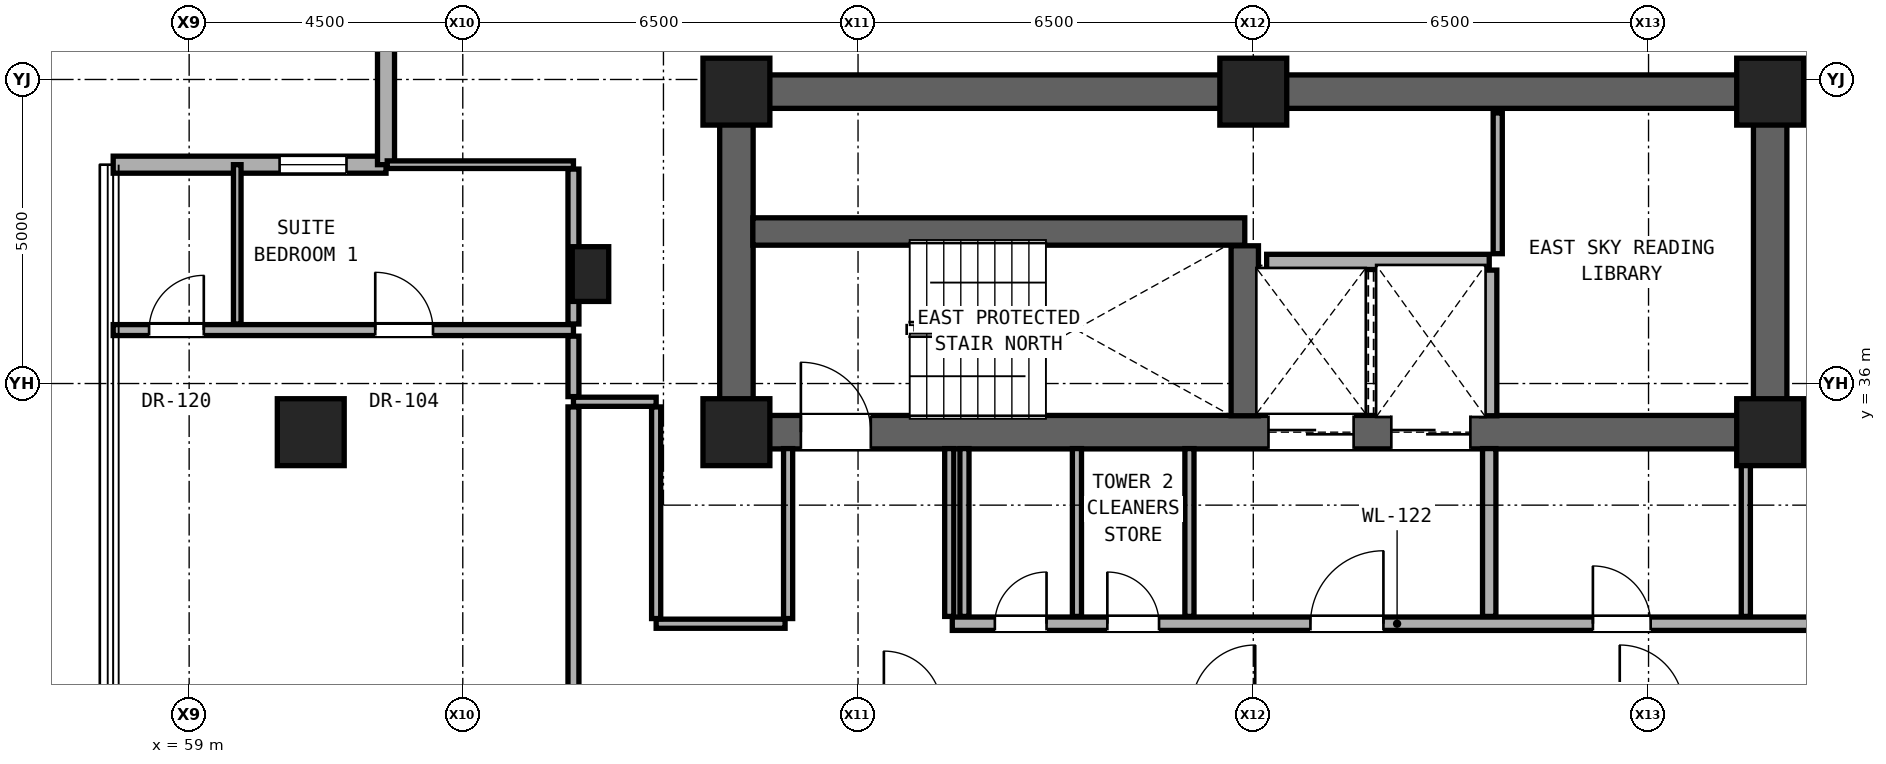
"""IFC4 building model, lengths in metres.
Left out: names, types, materials, properties, quantities, classifications, styles, units other than length and angle.
Written with IfcOpenShell. Run it as: python <this file> out.ifc"""

import sys

from ifc_helpers import new_model, si_unit, direction, frame, frame_2d, origin, origin_2d, place, context, subcontext, project, spatial, rectangle, hollow_rectangle, extrude, element, fill, save


model = new_model("IFC4")
c1 = context("Model", 3, precision=1e-05, world=origin(), true_north=direction((0.0, 1.0)))
c2 = subcontext(c1, "Body", "Model", "MODEL_VIEW")
j1 = project(units=[si_unit("LENGTHUNIT", "METRE"), si_unit("PLANEANGLEUNIT", "RADIAN")], contexts=[c1])
p1 = place(None, origin())
s1 = spatial("IfcSite", under=j1, at=p1, CompositionType="ELEMENT")
p2 = place(p1, origin())
s2 = spatial("IfcBuilding", under=s1, at=p2, CompositionType="ELEMENT")
p3 = place(p2, frame((0.0, 0.0, 144.5)))
s3 = spatial("IfcBuildingStorey", under=s2, at=p3, CompositionType="ELEMENT", Elevation=144.5)
for number, where, z_axis, x_axis in (
    (1, (68.0, 35.2, 0.0), (0.0, 0.0, 1.0), (1.0, 0.0, 0.0)),
    (2, (85.0, 35.2, 0.0), (0.0, 0.0, 1.0), (1.0, 0.0, 0.0)),
    (3, (68.0, 40.8, 0.0), (0.0, 0.0, 1.0), (1.0, 0.0, 0.0)),
    (4, (76.5, 40.8, 0.0), (0.0, 0.0, 1.0), (1.0, 0.0, 0.0)),
    (5, (85.0, 40.8, 0.0), (0.0, 0.0, 1.0), (1.0, 0.0, 0.0)),
):
    element("IfcColumn", number, at=place(p3, frame(where, z_axis=z_axis, x_axis=x_axis)), inside=s3, PredefinedType="COLUMN", context=c2, shape_type="SweptSolid", body=[
        extrude(rectangle(XDim=1.1, YDim=1.1, at=origin_2d()), origin(), (0.0, 0.0, 1.0), 3.3),
    ])
p4 = place(p3, frame((61.0, 35.2, 0.0), z_axis=(0.0, 0.0, 1.0), x_axis=(1.0, 0.0, 0.0)))
e6 = element("IfcColumn", 6, at=p4, inside=s3, PredefinedType="COLUMN", context=c2, shape_type="SweptSolid", body=[
    extrude(hollow_rectangle(XDim=1.1, YDim=1.1, WallThickness=0.06, at=origin_2d()), origin(), (0.0, 0.0, 1.0), 3.3),
])
p5 = place(p3, frame((65.6, 37.8, 0.0), z_axis=(0.0, 0.0, 1.0), x_axis=(1.0, 0.0, 0.0)))
e7 = element("IfcColumn", 7, at=p5, inside=s3, PredefinedType="PILASTER", context=c2, shape_type="SweptSolid", body=[
    extrude(rectangle(XDim=0.6, YDim=0.9, at=origin_2d()), origin(), (0.0, 0.0, 1.0), 3.3),
])
p6 = place(p3, frame((68.0, 40.8, 0.0), z_axis=(0.0, 0.0, 1.0), x_axis=(1.0, 0.0, 0.0)))
e8 = element("IfcWall", 8, at=p6, inside=s3, PredefinedType="SHEAR", context=c2, shape_type="SweptSolid", body=[
    extrude(rectangle(XDim=17.0, YDim=0.55, at=frame_2d((8.5, 0.0))), origin(), (0.0, 0.0, 1.0), 2.94),
])
for number, where, z_axis, x_axis in (
    (9, (68.0, 35.2, 0.0), (0.0, 0.0, 1.0), (0.0, 1.0, 0.0)),
    (10, (85.0, 35.2, 0.0), (0.0, 0.0, 1.0), (0.0, 1.0, 0.0)),
):
    element("IfcWall", number, at=place(p3, frame(where, z_axis=z_axis, x_axis=x_axis)), inside=s3, PredefinedType="SHEAR", context=c2, shape_type="SweptSolid", body=[
        extrude(rectangle(XDim=5.6, YDim=0.55, at=frame_2d((2.8, 0.0))), origin(), (0.0, 0.0, 1.0), 2.94),
    ])
p7 = place(p3, frame((68.0, 35.2, 0.0), z_axis=(0.0, 0.0, 1.0), x_axis=(1.0, 0.0, 0.0)))
e11 = element("IfcWall", 11, at=p7, inside=s3, PredefinedType="SHEAR", context=c2, shape_type="SweptSolid", body=[
    extrude(rectangle(XDim=17.0, YDim=0.55, at=frame_2d((8.5, 0.0))), origin(), (0.0, 0.0, 1.0), 2.94),
])
p8 = place(p7, frame((1.06, 0.0, 0.0)))
e12 = element("IfcOpeningElement", 12, at=p8, cuts=e11, PredefinedType="OPENING", context=c2, shape_type="SweptSolid", body=[
    extrude(rectangle(XDim=1.15, YDim=2.2, at=frame_2d((0.575, 1.1))), frame((0.0, 0.285, 0.0), z_axis=(0.0, -1.0, 0.0), x_axis=(1.0, 0.0, 0.0)), (0.0, 0.0, 1.0), 0.57),
])
p9 = place(p7, frame((8.75, 0.0, 0.0)))
e13 = element("IfcOpeningElement", 13, at=p9, cuts=e11, PredefinedType="OPENING", context=c2, shape_type="SweptSolid", body=[
    extrude(rectangle(XDim=1.4, YDim=2.35, at=frame_2d((0.7, 1.175))), frame((0.0, 0.285, 0.0), z_axis=(0.0, -1.0, 0.0), x_axis=(1.0, 0.0, 0.0)), (0.0, 0.0, 1.0), 0.57),
])
p10 = place(p7, frame((10.77, 0.0, 0.0)))
e14 = element("IfcOpeningElement", 14, at=p10, cuts=e11, PredefinedType="OPENING", context=c2, shape_type="SweptSolid", body=[
    extrude(rectangle(XDim=1.3, YDim=2.3, at=frame_2d((0.65, 1.15))), frame((0.0, 0.285, 0.0), z_axis=(0.0, -1.0, 0.0), x_axis=(1.0, 0.0, 0.0)), (0.0, 0.0, 1.0), 0.57),
])
p11 = place(p3, frame((62.238, 39.599, 0.0), z_axis=(0.0, 0.0, 1.0), x_axis=(-1.0, 0.0, 0.0)))
e15 = element("IfcWall", 15, at=p11, inside=s3, PredefinedType="SOLIDWALL", context=c2, shape_type="SweptSolid", body=[
    extrude(rectangle(XDim=4.487, YDim=0.28, at=frame_2d((2.243, 0.0))), origin(), (0.0, 0.0, 1.0), 2.56),
])
p12 = place(p11, frame((0.65, 0.0, 0.41)))
e16 = element("IfcOpeningElement", 16, at=p12, cuts=e15, PredefinedType="OPENING", context=c2, shape_type="SweptSolid", body=[
    extrude(rectangle(XDim=1.1, YDim=2.0, at=frame_2d((0.55, 1.0))), frame((0.0, 0.15, 0.0), z_axis=(0.0, -1.0, 0.0), x_axis=(1.0, 0.0, 0.0)), (0.0, 0.0, 1.0), 0.3),
])
p13 = place(p3, frame((62.238, 44.085, 0.0), z_axis=(0.0, 0.0, 1.0), x_axis=(0.0, -1.0, 0.0)))
e17 = element("IfcWall", 17, at=p13, inside=s3, PredefinedType="SOLIDWALL", context=c2, shape_type="SweptSolid", body=[
    extrude(rectangle(XDim=4.487, YDim=0.28, at=frame_2d((2.243, 0.0))), origin(), (0.0, 0.0, 1.0), 2.56),
])
p14 = place(p3, frame((66.68, 32.05, 0.0), z_axis=(0.0, 0.0, 1.0), x_axis=(1.0, 0.0, 0.0)))
e18 = element("IfcWall", 18, at=p14, inside=s3, PredefinedType="PARTITIONING", context=c2, shape_type="SweptSolid", body=[
    extrude(rectangle(XDim=2.12, YDim=0.15, at=frame_2d((1.06, 0.0))), origin(), (0.0, 0.0, 1.0), 2.316),
])
p15 = place(p3, frame((71.55, 32.05, 0.0), z_axis=(0.0, 0.0, 1.0), x_axis=(1.0, 0.0, 0.0)))
e19 = element("IfcWall", 19, at=p15, inside=s3, PredefinedType="SOLIDWALL", context=c2, shape_type="SweptSolid", body=[
    extrude(rectangle(XDim=14.63, YDim=0.22, at=frame_2d((7.315, 0.0))), origin(), (0.0, 0.0, 1.0), 2.316),
])
p16 = place(p15, frame((5.89, 0.0, 0.0)))
e20 = element("IfcOpeningElement", 20, at=p16, cuts=e19, PredefinedType="OPENING", context=c2, shape_type="SweptSolid", body=[
    extrude(rectangle(XDim=1.2, YDim=2.25, at=frame_2d((0.6, 1.125))), frame((0.0, 0.12, 0.0), z_axis=(0.0, -1.0, 0.0), x_axis=(1.0, 0.0, 0.0)), (0.0, 0.0, 1.0), 0.24),
])
p17 = place(p15, frame((10.535, 0.0, 0.0)))
e21 = element("IfcOpeningElement", 21, at=p17, cuts=e19, PredefinedType="OPENING", context=c2, shape_type="SweptSolid", body=[
    extrude(rectangle(XDim=0.95, YDim=2.15, at=frame_2d((0.475, 1.075))), frame((0.0, 0.12, 0.0), z_axis=(0.0, -1.0, 0.0), x_axis=(1.0, 0.0, 0.0)), (0.0, 0.0, 1.0), 0.24),
])
p18 = place(p15, frame((0.7, 0.0, 0.0)))
e22 = element("IfcOpeningElement", 22, at=p18, cuts=e19, PredefinedType="OPENING", context=c2, shape_type="SweptSolid", body=[
    extrude(rectangle(XDim=0.85, YDim=2.01, at=frame_2d((0.425, 1.005))), frame((0.0, 0.12, 0.0), z_axis=(0.0, -1.0, 0.0), x_axis=(1.0, 0.0, 0.0)), (0.0, 0.0, 1.0), 0.24),
])
p19 = place(p15, frame((2.55, 0.0, 0.0)))
e23 = element("IfcOpeningElement", 23, at=p19, cuts=e19, PredefinedType="OPENING", context=c2, shape_type="SweptSolid", body=[
    extrude(rectangle(XDim=0.85, YDim=2.01, at=frame_2d((0.425, 1.005))), frame((0.0, 0.12, 0.0), z_axis=(0.0, -1.0, 0.0), x_axis=(1.0, 0.0, 0.0)), (0.0, 0.0, 1.0), 0.24),
])
p20 = place(p3, frame((65.32, 35.7, 0.0), z_axis=(0.0, 0.0, 1.0), x_axis=(1.0, 0.0, 0.0)))
e24 = element("IfcWall", 24, at=p20, inside=s3, PredefinedType="PARTITIONING", context=c2, shape_type="SweptSolid", body=[
    extrude(rectangle(XDim=1.36, YDim=0.15, at=frame_2d((0.68, 0.0))), origin(), (0.0, 0.0, 1.0), 2.94),
])
p21 = place(p3, frame((57.751, 36.879, 0.0), z_axis=(0.0, 0.0, 1.0), x_axis=(1.0, 0.0, 0.0)))
e25 = element("IfcWall", 25, at=p21, inside=s3, PredefinedType="PARTITIONING", context=c2, shape_type="SweptSolid", body=[
    extrude(rectangle(XDim=7.569, YDim=0.18, at=frame_2d((3.785, 0.0))), origin(), (0.0, 0.0, 1.0), 2.383),
])
p22 = place(p21, frame((4.31, 0.0, 0.0)))
e26 = element("IfcOpeningElement", 26, at=p22, cuts=e25, PredefinedType="OPENING", context=c2, shape_type="SweptSolid", body=[
    extrude(rectangle(XDim=0.95, YDim=2.15, at=frame_2d((0.475, 1.075))), frame((0.0, 0.1, 0.0), z_axis=(0.0, -1.0, 0.0), x_axis=(1.0, 0.0, 0.0)), (0.0, 0.0, 1.0), 0.2),
])
p23 = place(p21, frame((0.59, 0.0, 0.0)))
e27 = element("IfcOpeningElement", 27, at=p23, cuts=e25, PredefinedType="OPENING", context=c2, shape_type="SweptSolid", body=[
    extrude(rectangle(XDim=0.9, YDim=2.1, at=frame_2d((0.45, 1.05))), frame((0.0, 0.1, 0.0), z_axis=(0.0, -1.0, 0.0), x_axis=(1.0, 0.0, 0.0)), (0.0, 0.0, 1.0), 0.2),
])
p24 = place(p3, frame((76.72, 38.0, 0.0), z_axis=(0.0, 0.0, 1.0), x_axis=(1.0, 0.0, 0.0)))
e28 = element("IfcWall", 28, at=p24, inside=s3, PredefinedType="SOLIDWALL", context=c2, shape_type="SweptSolid", body=[
    extrude(rectangle(XDim=3.66, YDim=0.25, at=frame_2d((1.83, 0.0))), origin(), (0.0, 0.0, 1.0), 2.94),
])
p25 = place(p3, frame((68.27, 38.5, 0.0), z_axis=(0.0, 0.0, 1.0), x_axis=(1.0, 0.0, 0.0)))
e29 = element("IfcWall", 29, at=p25, inside=s3, PredefinedType="SHEAR", context=c2, shape_type="SweptSolid", body=[
    extrude(rectangle(XDim=8.09, YDim=0.45, at=frame_2d((4.045, 0.0))), origin(), (0.0, 0.0, 1.0), 2.94),
])
p26 = place(p3, frame((62.258, 39.599, 0.0), z_axis=(0.0, 0.0, 1.0), x_axis=(1.0, 0.0, 0.0)))
e30 = element("IfcWall", 30, at=p26, inside=s3, PredefinedType="PARTITIONING", context=c2, shape_type="SweptSolid", body=[
    extrude(rectangle(XDim=3.062, YDim=0.125, at=frame_2d((1.531, 0.0))), origin(), (0.0, 0.0, 1.0), 2.94),
])
p27 = place(p3, frame((59.791, 36.979, 0.0), z_axis=(0.0, 0.0, 1.0), x_axis=(0.0, 1.0, 0.0)))
e31 = element("IfcWall", 31, at=p27, inside=s3, PredefinedType="PARTITIONING", context=c2, shape_type="SweptSolid", body=[
    extrude(rectangle(XDim=2.62, YDim=0.125, at=frame_2d((1.31, 0.0))), origin(), (0.0, 0.0, 1.0), 2.94),
])
p28 = place(p3, frame((65.32, 20.385, 0.0), z_axis=(0.0, 0.0, 1.0), x_axis=(0.0, 1.0, 0.0)))
e32 = element("IfcWall", 32, at=p28, inside=s3, PredefinedType="PARTITIONING", context=c2, shape_type="SweptSolid", body=[
    extrude(rectangle(XDim=15.23, YDim=0.18, at=frame_2d((7.615, 0.0))), origin(), (0.0, 0.0, 1.0), 2.316),
])
p29 = place(p28, frame((7.09, 0.0, 0.0)))
e33 = element("IfcOpeningElement", 33, at=p29, cuts=e32, PredefinedType="OPENING", context=c2, shape_type="SweptSolid", body=[
    extrude(rectangle(XDim=1.05, YDim=2.2, at=frame_2d((0.525, 1.1))), frame((0.0, 0.1, 0.0), z_axis=(0.0, -1.0, 0.0), x_axis=(1.0, 0.0, 0.0)), (0.0, 0.0, 1.0), 0.2),
])
p30 = place(p3, frame((65.32, 35.785, 0.0), z_axis=(0.0, 0.0, 1.0), x_axis=(0.0, 1.0, 0.0)))
e34 = element("IfcWall", 34, at=p30, inside=s3, PredefinedType="PARTITIONING", context=c2, shape_type="SweptSolid", body=[
    extrude(rectangle(XDim=0.994, YDim=0.18, at=frame_2d((0.497, 0.0))), origin(), (0.0, 0.0, 1.0), 2.94),
])
p31 = place(p3, frame((65.32, 36.979, 0.0), z_axis=(0.0, 0.0, 1.0), x_axis=(0.0, 1.0, 0.0)))
e35 = element("IfcWall", 35, at=p31, inside=s3, PredefinedType="PARTITIONING", context=c2, shape_type="SweptSolid", body=[
    extrude(rectangle(XDim=2.548, YDim=0.18, at=frame_2d((1.274, 0.0))), origin(), (0.0, 0.0, 1.0), 2.383),
])
p32 = place(p3, frame((66.68, 32.135, 0.0), z_axis=(0.0, 0.0, 1.0), x_axis=(0.0, 1.0, 0.0)))
e36 = element("IfcWall", 36, at=p32, inside=s3, PredefinedType="PARTITIONING", context=c2, shape_type="SweptSolid", body=[
    extrude(rectangle(XDim=3.48, YDim=0.15, at=frame_2d((1.74, 0.0))), origin(), (0.0, 0.0, 1.0), 2.332),
])
p33 = place(p3, frame((68.85, 32.135, 0.0), z_axis=(0.0, 0.0, 1.0), x_axis=(0.0, 1.0, 0.0)))
e37 = element("IfcWall", 37, at=p33, inside=s3, PredefinedType="PARTITIONING", context=c2, shape_type="SweptSolid", body=[
    extrude(rectangle(XDim=2.795, YDim=0.15, at=frame_2d((1.397, 0.0))), origin(), (0.0, 0.0, 1.0), 2.94),
])
for number, where, z_axis, x_axis in (
    (38, (71.5, 32.17, 0.0), (0.0, 0.0, 1.0), (0.0, 1.0, 0.0)),
    (39, (71.75, 32.17, 0.0), (0.0, 0.0, 1.0), (0.0, 1.0, 0.0)),
    (40, (73.6, 32.17, 0.0), (0.0, 0.0, 1.0), (0.0, 1.0, 0.0)),
    (41, (75.45, 32.17, 0.0), (0.0, 0.0, 1.0), (0.0, 1.0, 0.0)),
):
    element("IfcWall", number, at=place(p3, frame(where, z_axis=z_axis, x_axis=x_axis)), inside=s3, PredefinedType="PARTITIONING", context=c2, shape_type="SweptSolid", body=[
        extrude(rectangle(XDim=2.76, YDim=0.15, at=frame_2d((1.38, 0.0))), origin(), (0.0, 0.0, 1.0), 2.94),
    ])
p34 = place(p3, frame((76.36, 35.47, 0.0), z_axis=(0.0, 0.0, 1.0), x_axis=(0.0, 1.0, 0.0)))
e42 = element("IfcWall", 42, at=p34, inside=s3, PredefinedType="SHEAR", context=c2, shape_type="SweptSolid", body=[
    extrude(rectangle(XDim=2.795, YDim=0.45, at=frame_2d((1.397, 0.0))), origin(), (0.0, 0.0, 1.0), 2.94),
])
p35 = place(p3, frame((80.38, 32.17, 0.0), z_axis=(0.0, 0.0, 1.0), x_axis=(0.0, 1.0, 0.0)))
e43 = element("IfcWall", 43, at=p35, inside=s3, PredefinedType="SOLIDWALL", context=c2, shape_type="SweptSolid", body=[
    extrude(rectangle(XDim=2.76, YDim=0.22, at=frame_2d((1.38, 0.0))), origin(), (0.0, 0.0, 1.0), 2.94),
])
p36 = place(p3, frame((80.38, 35.47, 0.0), z_axis=(0.0, 0.0, 1.0), x_axis=(0.0, 1.0, 0.0)))
e44 = element("IfcWall", 44, at=p36, inside=s3, PredefinedType="SOLIDWALL", context=c2, shape_type="SweptSolid", body=[
    extrude(rectangle(XDim=2.395, YDim=0.25, at=frame_2d((1.198, 0.0))), origin(), (0.0, 0.0, 1.0), 2.94),
])
p37 = place(p3, frame((80.52, 38.135, 0.0), z_axis=(0.0, 0.0, 1.0), x_axis=(0.0, 1.0, 0.0)))
e45 = element("IfcWall", 45, at=p37, inside=s3, PredefinedType="PARTITIONING", context=c2, shape_type="SweptSolid", body=[
    extrude(rectangle(XDim=2.315, YDim=0.15, at=frame_2d((1.157, 0.0))), origin(), (0.0, 0.0, 1.0), 2.94),
])
p38 = place(p3, frame((84.6, 32.17, 0.0), z_axis=(0.0, 0.0, 1.0), x_axis=(0.0, 1.0, 0.0)))
e46 = element("IfcWall", 46, at=p38, inside=s3, PredefinedType="PARTITIONING", context=c2, shape_type="SweptSolid", body=[
    extrude(rectangle(XDim=2.76, YDim=0.15, at=frame_2d((1.38, 0.0))), origin(), (0.0, 0.0, 1.0), 2.94),
])
p39 = place(p12, origin())
e47 = element("IfcWindow", 47, at=p39, inside=s3, PartitioningType="SINGLE_PANEL", PredefinedType="WINDOW", context=c2, shape_type="SweptSolid", body=[
    extrude(rectangle(XDim=1.1, YDim=2.0, at=frame_2d((0.55, 1.0))), frame((0.0, 0.03, 0.0), z_axis=(0.0, -1.0, 0.0), x_axis=(1.0, 0.0, 0.0)), (0.0, 0.0, 1.0), 0.06),
])
fill(e16, e47)
p40 = place(p8, origin())
e48 = element("IfcDoor", 48, at=p40, inside=s3, OperationType="SINGLE_SWING_LEFT", PredefinedType="DOOR", context=c2, shape_type="SweptSolid", body=[
    extrude(rectangle(XDim=1.15, YDim=2.2, at=frame_2d((0.575, 1.1))), frame((0.0, 0.025, 0.0), z_axis=(0.0, -1.0, 0.0), x_axis=(1.0, 0.0, 0.0)), (0.0, 0.0, 1.0), 0.05),
])
fill(e12, e48)
p41 = place(p16, origin())
e49 = element("IfcDoor", 49, at=p41, inside=s3, OperationType="SINGLE_SWING_RIGHT", PredefinedType="DOOR", context=c2, shape_type="SweptSolid", body=[
    extrude(rectangle(XDim=1.2, YDim=2.25, at=frame_2d((0.6, 1.125))), frame((0.0, 0.025, 0.0), z_axis=(0.0, -1.0, 0.0), x_axis=(1.0, 0.0, 0.0)), (0.0, 0.0, 1.0), 0.05),
])
fill(e20, e49)
p42 = place(p17, origin())
e50 = element("IfcDoor", 50, at=p42, inside=s3, OperationType="SINGLE_SWING_LEFT", PredefinedType="DOOR", context=c2, shape_type="SweptSolid", body=[
    extrude(rectangle(XDim=0.95, YDim=2.15, at=frame_2d((0.475, 1.075))), frame((0.0, 0.025, 0.0), z_axis=(0.0, -1.0, 0.0), x_axis=(1.0, 0.0, 0.0)), (0.0, 0.0, 1.0), 0.05),
])
fill(e21, e50)
p43 = place(p18, origin())
e51 = element("IfcDoor", 51, at=p43, inside=s3, OperationType="SINGLE_SWING_RIGHT", PredefinedType="DOOR", context=c2, shape_type="SweptSolid", body=[
    extrude(rectangle(XDim=0.85, YDim=2.01, at=frame_2d((0.425, 1.005))), frame((0.0, 0.025, 0.0), z_axis=(0.0, -1.0, 0.0), x_axis=(1.0, 0.0, 0.0)), (0.0, 0.0, 1.0), 0.05),
])
fill(e22, e51)
p44 = place(p19, origin())
e52 = element("IfcDoor", 52, at=p44, inside=s3, OperationType="SINGLE_SWING_LEFT", PredefinedType="DOOR", context=c2, shape_type="SweptSolid", body=[
    extrude(rectangle(XDim=0.85, YDim=2.01, at=frame_2d((0.425, 1.005))), frame((0.0, 0.025, 0.0), z_axis=(0.0, -1.0, 0.0), x_axis=(1.0, 0.0, 0.0)), (0.0, 0.0, 1.0), 0.05),
])
fill(e23, e52)
p45 = place(p22, origin())
e53 = element("IfcDoor", 53, at=p45, inside=s3, OperationType="SINGLE_SWING_LEFT", PredefinedType="DOOR", context=c2, shape_type="SweptSolid", body=[
    extrude(rectangle(XDim=0.95, YDim=2.15, at=frame_2d((0.475, 1.075))), frame((0.0, 0.025, 0.0), z_axis=(0.0, -1.0, 0.0), x_axis=(1.0, 0.0, 0.0)), (0.0, 0.0, 1.0), 0.05),
])
fill(e26, e53)
p46 = place(p23, origin())
e54 = element("IfcDoor", 54, at=p46, inside=s3, OperationType="SINGLE_SWING_RIGHT", PredefinedType="DOOR", context=c2, shape_type="SweptSolid", body=[
    extrude(rectangle(XDim=0.9, YDim=2.1, at=frame_2d((0.45, 1.05))), frame((0.0, 0.025, 0.0), z_axis=(0.0, -1.0, 0.0), x_axis=(1.0, 0.0, 0.0)), (0.0, 0.0, 1.0), 0.05),
])
fill(e27, e54)
p47 = place(p9, origin())
e55 = element("IfcDoor", 55, at=p47, inside=s3, OperationType="DOUBLE_DOOR_SLIDING", PredefinedType="DOOR", context=c2, shape_type="SweptSolid", body=[
    extrude(rectangle(XDim=1.4, YDim=2.35, at=frame_2d((0.7, 1.175))), frame((0.0, 0.025, 0.0), z_axis=(0.0, -1.0, 0.0), x_axis=(1.0, 0.0, 0.0)), (0.0, 0.0, 1.0), 0.05),
])
fill(e13, e55)
p48 = place(p10, origin())
e56 = element("IfcDoor", 56, at=p48, inside=s3, OperationType="DOUBLE_DOOR_SLIDING", PredefinedType="DOOR", context=c2, shape_type="SweptSolid", body=[
    extrude(rectangle(XDim=1.3, YDim=2.3, at=frame_2d((0.65, 1.15))), frame((0.0, 0.025, 0.0), z_axis=(0.0, -1.0, 0.0), x_axis=(1.0, 0.0, 0.0)), (0.0, 0.0, 1.0), 0.05),
])
fill(e14, e56)
save(model, sys.argv[1])
